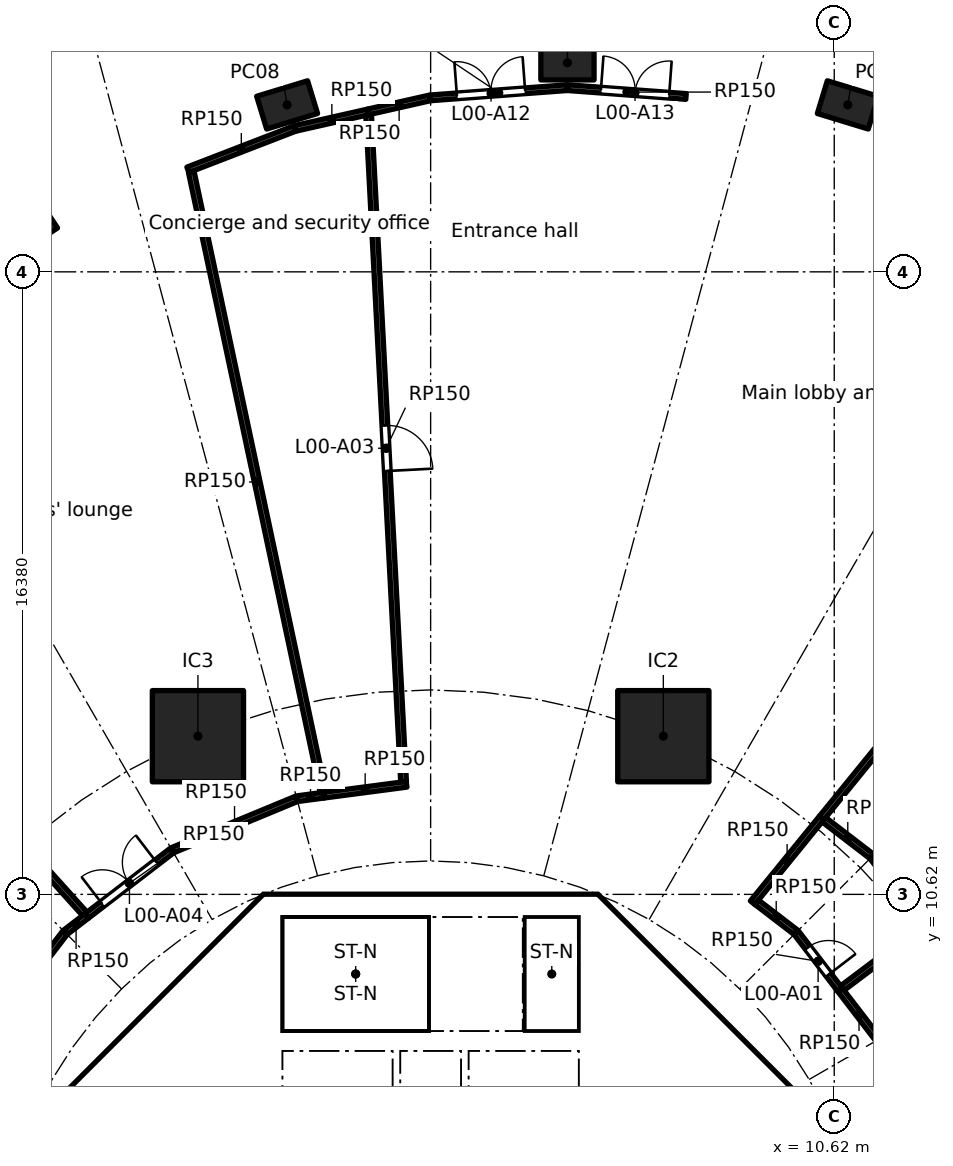
"""IFC4 building model, lengths in metres.
Left out: names, types, materials, properties, quantities, classifications, styles, units other than length and angle.
Written with IfcOpenShell. Run it as: python <this file> out.ifc"""

import sys

from ifc_helpers import new_model, si_unit, direction, frame, frame_2d, origin, origin_2d, place, context, subcontext, project, spatial, polyline, rectangle, hollow_rectangle, outline, extrude, element, fill, save


model = new_model("IFC4")
c1 = context("Model", 3, precision=1e-05, world=origin(), true_north=direction((0.0, 1.0)))
c2 = subcontext(c1, "Body", "Model", "MODEL_VIEW")
j1 = project(units=[si_unit("LENGTHUNIT", "METRE"), si_unit("PLANEANGLEUNIT", "RADIAN")], contexts=[c1])
p1 = place(None, origin())
s1 = spatial("IfcSite", under=j1, at=p1, CompositionType="ELEMENT")
p2 = place(p1, origin())
s2 = spatial("IfcBuilding", under=s1, at=p2, CompositionType="ELEMENT")
p3 = place(p2, origin())
s3 = spatial("IfcBuildingStorey", under=s2, at=p3, CompositionType="ELEMENT", Elevation=0.0)
for number, where, z_axis, x_axis in (
    (1, (10.976, 31.393, 0.0), (0.0, 0.0, 1.0), (-0.957, 0.292, 0.0)),
    (2, (3.6, 32.5, 0.0), (0.0, 0.0, 1.0), (-1.0, 0.0, 0.0)),
    (3, (-3.776, 31.393, 0.0), (0.0, 0.0, 1.0), (-0.957, -0.292, 0.0)),
    (4, (-10.65, 28.146, 0.0), (0.0, 0.0, 1.0), (-0.836, -0.549, 0.0)),
):
    element("IfcColumn", number, at=place(p3, frame(where, z_axis=z_axis, x_axis=x_axis)), inside=s3, PredefinedType="COLUMN", context=c2, shape_type="SweptSolid", body=[
        extrude(hollow_rectangle(XDim=1.4, YDim=0.9, WallThickness=0.05, at=origin_2d()), origin(), (0.0, 0.0, 1.0), 7.0),
    ])
for number, where, z_axis, x_axis in (
    (5, (6.123, 14.782, 0.0), (0.0, 0.0, 1.0), (1.0, 0.0, 0.0)),
    (6, (-6.123, 14.782, 0.0), (0.0, 0.0, 1.0), (1.0, 0.0, 0.0)),
):
    element("IfcColumn", number, at=place(p3, frame(where, z_axis=z_axis, x_axis=x_axis)), inside=s3, PredefinedType="COLUMN", context=c2, shape_type="SweptSolid", body=[
        extrude(rectangle(XDim=2.4, YDim=2.4, at=origin_2d()), origin(), (0.0, 0.0, 1.0), 7.0),
    ])
p4 = place(p3, frame((9.988, 4.613, 0.0), z_axis=(0.0, 0.0, 1.0), x_axis=(-0.707106781187, 0.707106781187, 0.0)))
e7 = element("IfcWall", 7, at=p4, inside=s3, PredefinedType="SHEAR", context=c2, shape_type="SweptSolid", body=[
    extrude(rectangle(XDim=7.602, YDim=0.6, at=frame_2d((3.801, 0.0))), origin(), (0.0, 0.0, 1.0), 6.7),
])
p5 = place(p4, frame((3.201, 0.0, 0.0)))
e8 = element("IfcOpeningElement", 8, at=p5, cuts=e7, PredefinedType="OPENING", context=c2, shape_type="SweptSolid", body=[
    extrude(rectangle(XDim=1.2, YDim=2.1, at=frame_2d((0.6, 1.05))), frame((0.0, 0.31, 0.0), z_axis=(0.0, -1.0, 0.0), x_axis=(1.0, 0.0, 0.0)), (0.0, 0.0, 1.0), 0.62),
])
p6 = place(p3, frame((3.801, 10.325, 0.0), z_axis=(0.0, 0.0, 1.0), x_axis=(-1.0, 0.0, 0.0)))
e9 = element("IfcWall", 9, at=p6, inside=s3, PredefinedType="SHEAR", context=c2, shape_type="SweptSolid", body=[
    extrude(rectangle(XDim=7.602, YDim=0.6, at=frame_2d((3.801, 0.0))), origin(), (0.0, 0.0, 1.0), 6.7),
])
p7 = place(p6, frame((0.151, 0.0, 0.0)))
e10 = element("IfcOpeningElement", 10, at=p7, cuts=e9, PredefinedType="OPENING", context=c2, shape_type="SweptSolid", body=[
    extrude(rectangle(XDim=1.1, YDim=2.1, at=frame_2d((0.55, 1.05))), frame((0.0, 0.31, 0.0), z_axis=(0.0, -1.0, 0.0), x_axis=(1.0, 0.0, 0.0)), (0.0, 0.0, 1.0), 0.62),
])
p8 = place(p3, frame((-4.613, 9.988, 0.0), z_axis=(0.0, 0.0, 1.0), x_axis=(-0.707106781187, -0.707106781187, 0.0)))
e11 = element("IfcWall", 11, at=p8, inside=s3, PredefinedType="SHEAR", context=c2, shape_type="SweptSolid", body=[
    extrude(rectangle(XDim=7.602, YDim=0.6, at=frame_2d((3.801, 0.0))), origin(), (0.0, 0.0, 1.0), 6.7),
])
p9 = place(p8, frame((0.351, 0.0, 0.0)))
e12 = element("IfcOpeningElement", 12, at=p9, cuts=e11, PredefinedType="OPENING", context=c2, shape_type="SweptSolid", body=[
    extrude(rectangle(XDim=1.1, YDim=2.1, at=frame_2d((0.55, 1.05))), frame((0.0, 0.31, 0.0), z_axis=(0.0, -1.0, 0.0), x_axis=(1.0, 0.0, 0.0)), (0.0, 0.0, 1.0), 0.62),
])
p10 = place(p3, frame((-5.8, 4.3, 0.0), z_axis=(0.0, 0.0, 1.0), x_axis=(0.0, 1.0, 0.0)))
e13 = element("IfcWall", 13, at=p10, inside=s3, PredefinedType="PARTITIONING", context=c2, shape_type="SweptSolid", body=[
    extrude(rectangle(XDim=3.927, YDim=0.15, at=frame_2d((1.963, 0.0))), origin(), (0.0, 0.0, 1.0), 6.7),
])
p11 = place(p10, frame((1.551, 0.0, 0.0)))
e14 = element("IfcOpeningElement", 14, at=p11, cuts=e13, PredefinedType="OPENING", context=c2, shape_type="SweptSolid", body=[
    extrude(rectangle(XDim=0.9, YDim=2.1, at=frame_2d((0.45, 1.05))), frame((0.0, 0.085, 0.0), z_axis=(0.0, -1.0, 0.0), x_axis=(1.0, 0.0, 0.0)), (0.0, 0.0, 1.0), 0.17),
])
p12 = place(p3, frame((4.0, 4.3, 0.0), z_axis=(0.0, 0.0, 1.0), x_axis=(0.0, 1.0, 0.0)))
e15 = element("IfcWall", 15, at=p12, inside=s3, PredefinedType="SOLIDWALL", context=c2, shape_type="SweptSolid", body=[
    extrude(rectangle(XDim=2.2, YDim=0.2, at=frame_2d((1.1, 0.0))), origin(), (0.0, 0.0, 1.0), 6.7),
])
p13 = place(p12, frame((0.55, 0.0, 0.0)))
e16 = element("IfcOpeningElement", 16, at=p13, cuts=e15, PredefinedType="OPENING", context=c2, shape_type="SweptSolid", body=[
    extrude(rectangle(XDim=1.1, YDim=2.1, at=frame_2d((0.55, 1.05))), frame((0.0, 0.11, 0.0), z_axis=(0.0, -1.0, 0.0), x_axis=(1.0, 0.0, 0.0)), (0.0, 0.0, 1.0), 0.22),
])
p14 = place(p3, frame((-4.0, 4.3, 0.0), z_axis=(0.0, 0.0, 1.0), x_axis=(0.0, 1.0, 0.0)))
e17 = element("IfcWall", 17, at=p14, inside=s3, PredefinedType="SOLIDWALL", context=c2, shape_type="SweptSolid", body=[
    extrude(rectangle(XDim=2.2, YDim=0.2, at=frame_2d((1.1, 0.0))), origin(), (0.0, 0.0, 1.0), 6.7),
])
p15 = place(p14, frame((0.55, 0.0, 0.0)))
e18 = element("IfcOpeningElement", 18, at=p15, cuts=e17, PredefinedType="OPENING", context=c2, shape_type="SweptSolid", body=[
    extrude(rectangle(XDim=1.1, YDim=2.1, at=frame_2d((0.55, 1.05))), frame((0.0, 0.11, 0.0), z_axis=(0.0, -1.0, 0.0), x_axis=(1.0, 0.0, 0.0)), (0.0, 0.0, 1.0), 0.22),
])
p16 = place(p3, frame((4.0, 7.025, 0.0), z_axis=(0.0, 0.0, 1.0), x_axis=(0.0, 1.0, 0.0)))
e19 = element("IfcWall", 19, at=p16, inside=s3, PredefinedType="SOLIDWALL", context=c2, shape_type="SweptSolid", body=[
    extrude(rectangle(XDim=3.0, YDim=0.2, at=frame_2d((1.5, 0.0))), origin(), (0.0, 0.0, 1.0), 6.7),
])
p17 = place(p16, frame((0.925, 0.0, 0.0)))
e20 = element("IfcOpeningElement", 20, at=p17, cuts=e19, PredefinedType="OPENING", context=c2, shape_type="SweptSolid", body=[
    extrude(rectangle(XDim=1.1, YDim=2.1, at=frame_2d((0.55, 1.05))), frame((0.0, 0.11, 0.0), z_axis=(0.0, -1.0, 0.0), x_axis=(1.0, 0.0, 0.0)), (0.0, 0.0, 1.0), 0.22),
])
p18 = place(p3, origin())
e21 = element("IfcWall", 21, at=p18, inside=s3, PredefinedType="SHEAR", context=c2, shape_type="SweptSolid", body=[
    extrude(outline(polyline([(-3.801, 10.625), (-3.801, 10.025), (-4.152, 10.025), (-4.401, 9.776), (-4.825, 10.2), (-4.401, 10.625), (-3.801, 10.625)])), origin(), (0.0, 0.0, 1.0), 6.7),
])
p19 = place(p3, origin())
e22 = element("IfcWall", 22, at=p19, inside=s3, PredefinedType="SHEAR", context=c2, shape_type="SweptSolid", body=[
    extrude(outline(polyline([(4.825, 10.2), (4.401, 9.776), (4.152, 10.025), (3.801, 10.025), (3.801, 10.625), (4.401, 10.625), (4.825, 10.2)])), origin(), (0.0, 0.0, 1.0), 6.7),
])
for number, where, z_axis, x_axis in (
    (23, (-0.9, 4.3, 0.0), (0.0, 0.0, 1.0), (0.0, 1.0, 0.0)),
    (24, (0.9, 4.3, 0.0), (0.0, 0.0, 1.0), (0.0, 1.0, 0.0)),
):
    element("IfcWall", number, at=place(p3, frame(where, z_axis=z_axis, x_axis=x_axis)), inside=s3, PredefinedType="SOLIDWALL", context=c2, shape_type="SweptSolid", body=[
        extrude(rectangle(XDim=2.2, YDim=0.2, at=frame_2d((1.1, 0.0))), origin(), (0.0, 0.0, 1.0), 6.7),
    ])
p20 = place(p3, origin())
e25 = element("IfcWall", 25, at=p20, inside=s3, PredefinedType="SOLIDWALL", context=c2, shape_type="SweptSolid", body=[
    extrude(outline(polyline([(-3.9, 7.025), (-4.1, 7.025), (-4.1, 10.025), (-3.9, 10.025), (-3.9, 7.025)])), origin(), (0.0, 0.0, 1.0), 6.7),
])
p21 = place(p3, origin())
e26 = element("IfcWall", 26, at=p21, inside=s3, PredefinedType="SOLIDWALL", context=c2, shape_type="SweptSolid", body=[
    extrude(outline(polyline([(4.1, 6.5), (-4.1, 6.5), (-4.1, 7.025), (4.1, 7.025), (4.1, 6.5)])), origin(), (0.0, 0.0, 1.0), 6.7),
])
p22 = place(p3, frame((-17.966, 19.953, 0.0), z_axis=(0.0, 0.0, 1.0), x_axis=(0.669125575908, -0.743149354885, 0.0)))
e27 = element("IfcWall", 27, at=p22, inside=s3, PredefinedType="PARTITIONING", context=c2, shape_type="SweptSolid", body=[
    extrude(rectangle(XDim=13.249, YDim=0.15, at=frame_2d((6.624, 0.0))), origin(), (0.0, 0.0, 1.0), 6.7),
])
p23 = place(p3, frame((-11.771, 6.809, 0.0), z_axis=(0.0, 0.0, 1.0), x_axis=(0.608736710054, 0.793372307201, 0.0)))
e28 = element("IfcWall", 28, at=p23, inside=s3, PredefinedType="PARTITIONING", context=c2, shape_type="SweptSolid", body=[
    extrude(rectangle(XDim=3.527, YDim=0.15, at=frame_2d((1.763, 0.0))), origin(), (0.0, 0.0, 1.0), 6.7),
])
p24 = place(p3, frame((-9.607, 9.624, 0.0), z_axis=(0.0, 0.0, 1.0), x_axis=(0.793399175387, 0.608701690893, 0.0)))
e29 = element("IfcWall", 29, at=p24, inside=s3, PredefinedType="PARTITIONING", context=c2, shape_type="SweptSolid", body=[
    extrude(rectangle(XDim=0.702, YDim=0.15, at=frame_2d((0.351, 0.0))), origin(), (0.0, 0.0, 1.0), 6.7),
])
p25 = place(p3, frame((-9.05, 10.051, 0.0), z_axis=(0.0, 0.0, 1.0), x_axis=(0.793365630445, 0.608745411834, 0.0)))
e30 = element("IfcWall", 30, at=p25, inside=s3, PredefinedType="PARTITIONING", context=c2, shape_type="SweptSolid", body=[
    extrude(rectangle(XDim=2.825, YDim=0.15, at=frame_2d((1.412, 0.0))), origin(), (0.0, 0.0, 1.0), 6.7),
])
p26 = place(p25, frame((0.518, 0.0, 0.0)))
e31 = element("IfcOpeningElement", 31, at=p26, cuts=e30, PredefinedType="OPENING", context=c2, shape_type="SweptSolid", body=[
    extrude(rectangle(XDim=1.8, YDim=2.1, at=frame_2d((0.9, 1.05))), frame((0.0, 0.085, 0.0), z_axis=(0.0, -1.0, 0.0), x_axis=(1.0, 0.0, 0.0)), (0.0, 0.0, 1.0), 0.17),
])
p27 = place(p3, frame((-6.789, 11.782, 0.0), z_axis=(0.0, 0.0, 1.0), x_axis=(0.923881838111, 0.382677866108, 0.0)))
e32 = element("IfcWall", 32, at=p27, inside=s3, PredefinedType="PARTITIONING", context=c2, shape_type="SweptSolid", body=[
    extrude(rectangle(XDim=3.527, YDim=0.15, at=frame_2d((1.763, 0.0))), origin(), (0.0, 0.0, 1.0), 6.7),
])
p28 = place(p3, frame((-6.386, 29.685, 0.0), z_axis=(0.0, 0.0, 1.0), x_axis=(0.932843334817, 0.360282268074, 0.0)))
e33 = element("IfcWall", 33, at=p28, inside=s3, PredefinedType="PARTITIONING", context=c2, shape_type="SweptSolid", body=[
    extrude(rectangle(XDim=3.012, YDim=0.15, at=frame_2d((1.506, 0.0))), origin(), (0.0, 0.0, 1.0), 6.7),
])
p29 = place(p3, frame((-3.562, 30.774, 0.0), z_axis=(0.0, 0.0, 1.0), x_axis=(0.975336395286, 0.220723619105, 0.0)))
e34 = element("IfcWall", 34, at=p29, inside=s3, PredefinedType="PARTITIONING", context=c2, shape_type="SweptSolid", body=[
    extrude(rectangle(XDim=1.976, YDim=0.15, at=frame_2d((0.988, 0.0))), origin(), (0.0, 0.0, 1.0), 6.7),
])
p30 = place(p3, frame((-3.508, 13.138, 0.0), z_axis=(0.0, 0.0, 1.0), x_axis=(0.991460212813, 0.130409533429, 0.0)))
e35 = element("IfcWall", 35, at=p30, inside=s3, PredefinedType="PARTITIONING", context=c2, shape_type="SweptSolid", body=[
    extrude(rectangle(XDim=0.702, YDim=0.15, at=frame_2d((0.351, 0.0))), origin(), (0.0, 0.0, 1.0), 6.7),
])
p31 = place(p3, frame((-2.828, 13.303, 0.0), z_axis=(0.0, 0.0, 1.0), x_axis=(-0.207924325278, 0.978144915111, 0.0)))
e36 = element("IfcWall", 36, at=p31, inside=s3, PredefinedType="PARTITIONING", context=c2, shape_type="SweptSolid", body=[
    extrude(rectangle(XDim=16.699, YDim=0.15, at=frame_2d((8.35, 0.0))), origin(), (0.0, 0.0, 1.0), 6.7),
])
p32 = place(p3, frame((-2.812, 13.23, 0.0), z_axis=(0.0, 0.0, 1.0), x_axis=(0.991442947496, 0.130540728744, 0.0)))
e37 = element("IfcWall", 37, at=p32, inside=s3, PredefinedType="PARTITIONING", context=c2, shape_type="SweptSolid", body=[
    extrude(rectangle(XDim=2.198, YDim=0.15, at=frame_2d((1.099, 0.0))), origin(), (0.0, 0.0, 1.0), 6.7),
])
p33 = place(p3, frame((-1.636, 31.21, 0.0), z_axis=(0.0, 0.0, 1.0), x_axis=(0.975332482819, 0.220740906853, 0.0)))
e38 = element("IfcWall", 38, at=p33, inside=s3, PredefinedType="PARTITIONING", context=c2, shape_type="SweptSolid", body=[
    extrude(rectangle(XDim=1.655, YDim=0.15, at=frame_2d((0.827, 0.0))), origin(), (0.0, 0.0, 1.0), 6.7),
])
p34 = place(p3, frame((-0.712, 13.582, 0.0), z_axis=(0.0, 0.0, 1.0), x_axis=(-0.052338659043, 0.998629393103, 0.0)))
e39 = element("IfcWall", 39, at=p34, inside=s3, PredefinedType="PARTITIONING", context=c2, shape_type="SweptSolid", body=[
    extrude(rectangle(XDim=17.576, YDim=0.15, at=frame_2d((8.788, 0.0))), origin(), (0.0, 0.0, 1.0), 6.7),
])
p35 = place(p34, frame((8.189, 0.0, 0.0)))
e40 = element("IfcOpeningElement", 40, at=p35, cuts=e39, PredefinedType="OPENING", context=c2, shape_type="SweptSolid", body=[
    extrude(rectangle(XDim=1.2, YDim=2.1, at=frame_2d((0.6, 1.05))), frame((0.0, 0.085, 0.0), z_axis=(0.0, -1.0, 0.0), x_axis=(1.0, 0.0, 0.0)), (0.0, 0.0, 1.0), 0.17),
])
p36 = place(p3, frame((-0.007, 31.578, 0.0), z_axis=(0.0, 0.0, 1.0), x_axis=(0.997233506708, 0.074332584365, 0.0)))
e41 = element("IfcWall", 41, at=p36, inside=s3, PredefinedType="PARTITIONING", context=c2, shape_type="SweptSolid", body=[
    extrude(rectangle(XDim=3.61, YDim=0.15, at=frame_2d((1.805, 0.0))), origin(), (0.0, 0.0, 1.0), 6.7),
])
p37 = place(p36, frame((0.701, 0.0, 0.0)))
e42 = element("IfcOpeningElement", 42, at=p37, cuts=e41, PredefinedType="OPENING", context=c2, shape_type="SweptSolid", body=[
    extrude(rectangle(XDim=1.8, YDim=2.1, at=frame_2d((0.9, 1.05))), frame((0.0, 0.085, 0.0), z_axis=(0.0, -1.0, 0.0), x_axis=(1.0, 0.0, 0.0)), (0.0, 0.0, 1.0), 0.17),
])
p38 = place(p3, frame((3.608, 31.846, 0.0), z_axis=(0.0, 0.0, 1.0), x_axis=(0.997228552186, -0.074399023545, 0.0)))
e43 = element("IfcWall", 43, at=p38, inside=s3, PredefinedType="PARTITIONING", context=c2, shape_type="SweptSolid", body=[
    extrude(rectangle(XDim=3.121, YDim=0.15, at=frame_2d((1.56, 0.0))), origin(), (0.0, 0.0, 1.0), 6.7),
])
p39 = place(p38, frame((0.875, 0.0, 0.0)))
e44 = element("IfcOpeningElement", 44, at=p39, cuts=e43, PredefinedType="OPENING", context=c2, shape_type="SweptSolid", body=[
    extrude(rectangle(XDim=1.8, YDim=2.1, at=frame_2d((0.9, 1.05))), frame((0.0, 0.085, 0.0), z_axis=(0.0, -1.0, 0.0), x_axis=(1.0, 0.0, 0.0)), (0.0, 0.0, 1.0), 0.17),
])
p40 = place(p3, frame((8.472, 10.401, 0.0), z_axis=(0.0, 0.0, 1.0), x_axis=(0.631544460315, 0.775339664048, 0.0)))
e45 = element("IfcWall", 45, at=p40, inside=s3, PredefinedType="PARTITIONING", context=c2, shape_type="SweptSolid", body=[
    extrude(rectangle(XDim=2.876, YDim=0.15, at=frame_2d((1.438, 0.0))), origin(), (0.0, 0.0, 1.0), 6.7),
])
p41 = place(p3, frame((9.607, 9.624, 0.0), z_axis=(0.0, 0.0, 1.0), x_axis=(-0.793421424222, 0.608672690028, 0.0)))
e46 = element("IfcWall", 46, at=p41, inside=s3, PredefinedType="PARTITIONING", context=c2, shape_type="SweptSolid", body=[
    extrude(rectangle(XDim=1.296, YDim=0.15, at=frame_2d((0.648, 0.0))), origin(), (0.0, 0.0, 1.0), 6.7),
])
p42 = place(p3, frame((10.348, 12.585, 0.0), z_axis=(0.0, 0.0, 1.0), x_axis=(0.793328373205, -0.608793965368, 0.0)))
e47 = element("IfcWall", 47, at=p42, inside=s3, PredefinedType="PARTITIONING", context=c2, shape_type="SweptSolid", body=[
    extrude(rectangle(XDim=1.584, YDim=0.15, at=frame_2d((0.792, 0.0))), origin(), (0.0, 0.0, 1.0), 6.7),
])
p43 = place(p3, frame((10.288, 12.631, 0.0), z_axis=(0.0, 0.0, 1.0), x_axis=(0.631545274273, 0.775339001046, 0.0)))
e48 = element("IfcWall", 48, at=p43, inside=s3, PredefinedType="PARTITIONING", context=c2, shape_type="SweptSolid", body=[
    extrude(rectangle(XDim=16.345, YDim=0.15, at=frame_2d((8.173, 0.0))), origin(), (0.0, 0.0, 1.0), 6.7),
])
p44 = place(p3, frame((10.774, 8.109, 0.0), z_axis=(0.0, 0.0, 1.0), x_axis=(-0.608754453805, 0.793358692504, 0.0)))
e49 = element("IfcWall", 49, at=p44, inside=s3, PredefinedType="PARTITIONING", context=c2, shape_type="SweptSolid", body=[
    extrude(rectangle(XDim=1.888, YDim=0.15, at=frame_2d((0.944, 0.0))), origin(), (0.0, 0.0, 1.0), 6.7),
])
p45 = place(p44, frame((0.5, 0.0, 0.0)))
e50 = element("IfcOpeningElement", 50, at=p45, cuts=e49, PredefinedType="OPENING", context=c2, shape_type="SweptSolid", body=[
    extrude(rectangle(XDim=0.9, YDim=2.1, at=frame_2d((0.45, 1.05))), frame((0.0, 0.085, 0.0), z_axis=(0.0, -1.0, 0.0), x_axis=(1.0, 0.0, 0.0)), (0.0, 0.0, 1.0), 0.17),
])
p46 = place(p3, frame((11.621, 11.604, 0.0), z_axis=(0.0, 0.0, 1.0), x_axis=(0.608759688573, -0.793354675771, 0.0)))
e51 = element("IfcWall", 51, at=p46, inside=s3, PredefinedType="PARTITIONING", context=c2, shape_type="SweptSolid", body=[
    extrude(rectangle(XDim=2.358, YDim=0.15, at=frame_2d((1.179, 0.0))), origin(), (0.0, 0.0, 1.0), 6.7),
])
p47 = place(p3, frame((11.771, 6.809, 0.0), z_axis=(0.0, 0.0, 1.0), x_axis=(-0.608716251771, 0.793388003961, 0.0)))
e52 = element("IfcWall", 52, at=p47, inside=s3, PredefinedType="PARTITIONING", context=c2, shape_type="SweptSolid", body=[
    extrude(rectangle(XDim=1.638, YDim=0.15, at=frame_2d((0.819, 0.0))), origin(), (0.0, 0.0, 1.0), 6.7),
])
p48 = place(p3, frame((12.951, 9.748, 0.0), z_axis=(0.0, 0.0, 1.0), x_axis=(-0.798970748419, -0.601369888813, 0.0)))
e53 = element("IfcWall", 53, at=p48, inside=s3, PredefinedType="PARTITIONING", context=c2, shape_type="SweptSolid", body=[
    extrude(rectangle(XDim=2.65, YDim=0.15, at=frame_2d((1.325, 0.0))), origin(), (0.0, 0.0, 1.0), 6.7),
])
p49 = place(p13, origin())
e54 = element("IfcDoor", 54, at=p49, inside=s3, OperationType="DOUBLE_DOOR_SLIDING", PredefinedType="DOOR", context=c2, shape_type="SweptSolid", body=[
    extrude(rectangle(XDim=1.1, YDim=2.1, at=frame_2d((0.55, 1.05))), frame((0.0, 0.025, 0.0), z_axis=(0.0, -1.0, 0.0), x_axis=(1.0, 0.0, 0.0)), (0.0, 0.0, 1.0), 0.05),
])
fill(e16, e54)
p50 = place(p15, origin())
e55 = element("IfcDoor", 55, at=p50, inside=s3, OperationType="DOUBLE_DOOR_SLIDING", PredefinedType="DOOR", context=c2, shape_type="SweptSolid", body=[
    extrude(rectangle(XDim=1.1, YDim=2.1, at=frame_2d((0.55, 1.05))), frame((0.0, 0.025, 0.0), z_axis=(0.0, -1.0, 0.0), x_axis=(1.0, 0.0, 0.0)), (0.0, 0.0, 1.0), 0.05),
])
fill(e18, e55)
p51 = place(p17, origin())
e56 = element("IfcDoor", 56, at=p51, inside=s3, OperationType="SINGLE_SWING_LEFT", PredefinedType="DOOR", context=c2, shape_type="SweptSolid", body=[
    extrude(rectangle(XDim=1.1, YDim=2.1, at=frame_2d((0.55, 1.05))), frame((0.0, 0.025, 0.0), z_axis=(0.0, -1.0, 0.0), x_axis=(1.0, 0.0, 0.0)), (0.0, 0.0, 1.0), 0.05),
])
fill(e20, e56)
p52 = place(p11, origin())
e57 = element("IfcDoor", 57, at=p52, inside=s3, OperationType="SINGLE_SWING_RIGHT", PredefinedType="DOOR", context=c2, shape_type="SweptSolid", body=[
    extrude(rectangle(XDim=0.9, YDim=2.1, at=frame_2d((0.45, 1.05))), frame((0.0, 0.025, 0.0), z_axis=(0.0, -1.0, 0.0), x_axis=(1.0, 0.0, 0.0)), (0.0, 0.0, 1.0), 0.05),
])
fill(e14, e57)
p53 = place(p5, origin())
e58 = element("IfcDoor", 58, at=p53, inside=s3, OperationType="SINGLE_SWING_LEFT", PredefinedType="DOOR", context=c2, shape_type="SweptSolid", body=[
    extrude(rectangle(XDim=1.2, YDim=2.1, at=frame_2d((0.6, 1.05))), frame((0.0, 0.025, 0.0), z_axis=(0.0, -1.0, 0.0), x_axis=(1.0, 0.0, 0.0)), (0.0, 0.0, 1.0), 0.05),
])
fill(e8, e58)
p54 = place(p9, origin())
e59 = element("IfcDoor", 59, at=p54, inside=s3, OperationType="SINGLE_SWING_LEFT", PredefinedType="DOOR", context=c2, shape_type="SweptSolid", body=[
    extrude(rectangle(XDim=1.1, YDim=2.1, at=frame_2d((0.55, 1.05))), frame((0.0, 0.025, 0.0), z_axis=(0.0, -1.0, 0.0), x_axis=(1.0, 0.0, 0.0)), (0.0, 0.0, 1.0), 0.05),
])
fill(e12, e59)
p55 = place(p7, frame((1.1, 0.0, 0.0), x_axis=(-1.0, 0.0, 0.0)))
e60 = element("IfcDoor", 60, at=p55, inside=s3, OperationType="SINGLE_SWING_LEFT", PredefinedType="DOOR", context=c2, shape_type="SweptSolid", body=[
    extrude(rectangle(XDim=1.1, YDim=2.1, at=frame_2d((0.55, 1.05))), frame((0.0, 0.025, 0.0), z_axis=(0.0, -1.0, 0.0), x_axis=(1.0, 0.0, 0.0)), (0.0, 0.0, 1.0), 0.05),
])
fill(e10, e60)
p56 = place(p45, frame((0.9, 0.0, 0.0), x_axis=(-1.0, 0.0, 0.0)))
e61 = element("IfcDoor", 61, at=p56, inside=s3, OperationType="SINGLE_SWING_RIGHT", PredefinedType="DOOR", context=c2, shape_type="SweptSolid", body=[
    extrude(rectangle(XDim=0.9, YDim=2.1, at=frame_2d((0.45, 1.05))), frame((0.0, 0.025, 0.0), z_axis=(0.0, -1.0, 0.0), x_axis=(1.0, 0.0, 0.0)), (0.0, 0.0, 1.0), 0.05),
])
fill(e50, e61)
p57 = place(p35, frame((1.2, 0.0, 0.0), x_axis=(-1.0, 0.0, 0.0)))
e62 = element("IfcDoor", 62, at=p57, inside=s3, OperationType="SINGLE_SWING_RIGHT", PredefinedType="DOOR", context=c2, shape_type="SweptSolid", body=[
    extrude(rectangle(XDim=1.2, YDim=2.1, at=frame_2d((0.6, 1.05))), frame((0.0, 0.025, 0.0), z_axis=(0.0, -1.0, 0.0), x_axis=(1.0, 0.0, 0.0)), (0.0, 0.0, 1.0), 0.05),
])
fill(e40, e62)
p58 = place(p26, origin())
e63 = element("IfcDoor", 63, at=p58, inside=s3, OperationType="DOUBLE_DOOR_SINGLE_SWING", PredefinedType="DOOR", context=c2, shape_type="SweptSolid", body=[
    extrude(rectangle(XDim=1.8, YDim=2.1, at=frame_2d((0.9, 1.05))), frame((0.0, 0.025, 0.0), z_axis=(0.0, -1.0, 0.0), x_axis=(1.0, 0.0, 0.0)), (0.0, 0.0, 1.0), 0.05),
])
fill(e31, e63)
p59 = place(p37, origin())
e64 = element("IfcDoor", 64, at=p59, inside=s3, OperationType="DOUBLE_DOOR_SINGLE_SWING", PredefinedType="DOOR", context=c2, shape_type="SweptSolid", body=[
    extrude(rectangle(XDim=1.8, YDim=2.1, at=frame_2d((0.9, 1.05))), frame((0.0, 0.025, 0.0), z_axis=(0.0, -1.0, 0.0), x_axis=(1.0, 0.0, 0.0)), (0.0, 0.0, 1.0), 0.05),
])
fill(e42, e64)
p60 = place(p39, origin())
e65 = element("IfcDoor", 65, at=p60, inside=s3, OperationType="DOUBLE_DOOR_SINGLE_SWING", PredefinedType="DOOR", context=c2, shape_type="SweptSolid", body=[
    extrude(rectangle(XDim=1.8, YDim=2.1, at=frame_2d((0.9, 1.05))), frame((0.0, 0.025, 0.0), z_axis=(0.0, -1.0, 0.0), x_axis=(1.0, 0.0, 0.0)), (0.0, 0.0, 1.0), 0.05),
])
fill(e44, e65)
save(model, sys.argv[1])
